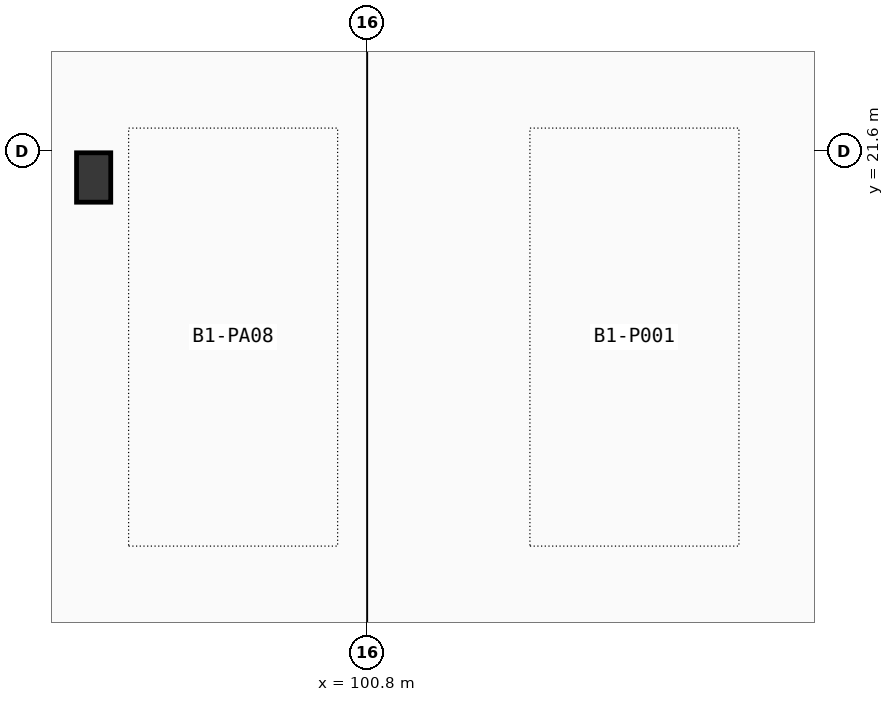
"""IFC4 building model, lengths in metres.
Left out: names, types, materials, properties, quantities, classifications, styles, units other than length and angle.
Written with IfcOpenShell. Run it as: python <this file> out.ifc"""

import sys

from ifc_helpers import new_model, si_unit, direction, frame, origin, origin_2d, place, context, subcontext, project, spatial, rectangle, extrude, element, save


model = new_model("IFC4")
c1 = context("Model", 3, precision=1e-05, world=origin(), true_north=direction((0.0, 1.0)))
c2 = subcontext(c1, "Body", "Model", "MODEL_VIEW")
j1 = project(units=[si_unit("LENGTHUNIT", "METRE"), si_unit("PLANEANGLEUNIT", "RADIAN")], contexts=[c1])
p1 = place(None, origin())
s1 = spatial("IfcSite", under=j1, at=p1, CompositionType="ELEMENT")
p2 = place(p1, origin())
s2 = spatial("IfcBuilding", under=s1, at=p2, CompositionType="ELEMENT")
p3 = place(p2, frame((0.0, 0.0, -4.2)))
s3 = spatial("IfcBuildingStorey", under=s2, at=p3, CompositionType="ELEMENT", Elevation=-4.2)
p4 = place(p3, frame((97.2, 21.25, 0.0), z_axis=(0.0, 0.0, 1.0), x_axis=(1.0, 0.0, 0.0)))
e1 = element("IfcColumn", 1, at=p4, inside=s3, PredefinedType="PILASTER", context=c2, shape_type="SweptSolid", body=[
    extrude(rectangle(XDim=0.45, YDim=0.65, at=origin_2d()), origin(), (0.0, 0.0, 1.0), 4.2),
])
save(model, sys.argv[1])
